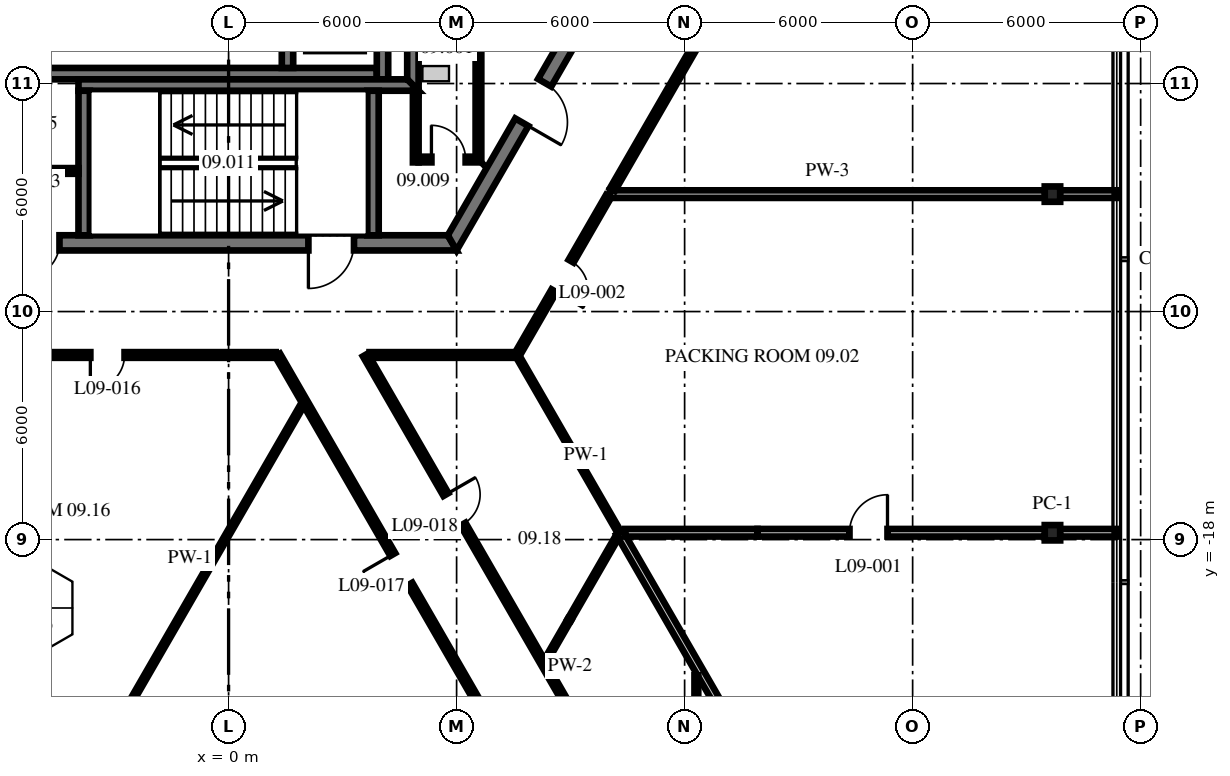
"""IFC4 building model, lengths in metres.
Left out: names, types, materials, properties, quantities, classifications, styles, units other than length and angle.
Written with IfcOpenShell. Run it as: python <this file> out.ifc"""

import sys

from ifc_helpers import new_model, si_unit, direction, frame, frame_2d, origin, origin_2d, place, context, subcontext, project, spatial, polyline, rectangle, i_section, outline, extrude, source, transform, mapped, element, fill, save


model = new_model("IFC4")
c1 = context("Model", 3, precision=1e-05, world=origin(), true_north=direction((0.0, 1.0)))
c2 = subcontext(c1, "Body", "Model", "MODEL_VIEW")
j1 = project(units=[si_unit("LENGTHUNIT", "METRE"), si_unit("PLANEANGLEUNIT", "RADIAN")], contexts=[c1])
p1 = place(None, origin())
s1 = spatial("IfcSite", under=j1, at=p1, CompositionType="ELEMENT")
p2 = place(p1, origin())
s2 = spatial("IfcBuilding", under=s1, at=p2, CompositionType="ELEMENT")
p3 = place(p2, frame((0.0, 0.0, 41.8)))
s3 = spatial("IfcBuildingStorey", under=s2, at=p3, CompositionType="ELEMENT", Elevation=41.8)
m1 = source(origin(), c2, "Body", "SweptSolid", [
    extrude(i_section(OverallWidth=0.404, OverallDepth=0.406, WebThickness=0.027, FlangeThickness=0.044, at=origin_2d()), origin(), (0.0, 0.0, 1.0), 4.3),
])
for number, where, z_axis, x_axis in (
    (1, (21.679, -17.82, 0.0), (0.0, 0.0, 1.0), (0.0, 1.0, 0.0)),
    (2, (21.679, -8.91, 0.0), (0.0, 0.0, 1.0), (0.0, 1.0, 0.0)),
):
    element("IfcColumn", number, at=place(p3, frame(where, z_axis=z_axis, x_axis=x_axis)), inside=s3, PredefinedType="COLUMN", context=c2, shape_type="MappedRepresentation", body=[
        mapped(m1, transform((0.0, 0.0, 0.0), scale=1.0)),
    ])
m2 = source(origin(), c2, "Body", "SweptSolid", [
    extrude(outline(polyline([(-0.115, -0.2), (11.885, -0.2), (11.654, 0.2), (0.115, 0.2), (-0.115, -0.2)])), origin(), (0.0, 0.0, 1.0), 4.1),
])
p4 = place(p3, frame((-5.885, -10.192, 0.0), z_axis=(0.0, 0.0, 1.0), x_axis=(1.0, 0.0, 0.0)))
e3 = element("IfcWall", 3, at=p4, inside=s3, PredefinedType="SHEAR", context=c2, shape_type="MappedRepresentation", body=[
    mapped(m2, transform((0.0, 0.0, 0.0), scale=1.0)),
])
p5 = place(p4, frame((7.985, 0.0, 0.0)))
e4 = element("IfcOpeningElement", 4, at=p5, cuts=e3, PredefinedType="OPENING", context=c2, shape_type="SweptSolid", body=[
    extrude(rectangle(XDim=1.2, YDim=2.1, at=frame_2d((0.6, 1.05))), frame((0.0, 0.21, 0.0), z_axis=(0.0, -1.0, 0.0), x_axis=(1.0, 0.0, 0.0)), (0.0, 0.0, 1.0), 0.42),
])
p6 = place(p4, frame((0.534, 0.0, 0.0)))
e5 = element("IfcOpeningElement", 5, at=p6, cuts=e3, PredefinedType="OPENING", context=c2, shape_type="SweptSolid", body=[
    extrude(rectangle(XDim=0.9, YDim=2.1, at=frame_2d((0.45, 1.05))), frame((0.0, 0.21, 0.0), z_axis=(0.0, -1.0, 0.0), x_axis=(1.0, 0.0, 0.0)), (0.0, 0.0, 1.0), 0.42),
])
p7 = place(p3, frame((5.885, -10.192, 0.0), z_axis=(0.0, 0.0, 1.0), x_axis=(0.499996592174, 0.866027371285, 0.0)))
e6 = element("IfcWall", 6, at=p7, inside=s3, PredefinedType="SHEAR", context=c2, shape_type="MappedRepresentation", body=[
    mapped(m2, transform((0.0, 0.0, 0.0), scale=1.0)),
])
p8 = place(p7, frame((3.665, 0.0, 0.0)))
e7 = element("IfcOpeningElement", 7, at=p8, cuts=e6, PredefinedType="OPENING", context=c2, shape_type="SweptSolid", body=[
    extrude(rectangle(XDim=1.2, YDim=2.1, at=frame_2d((0.6, 1.05))), frame((0.0, 0.21, 0.0), z_axis=(0.0, -1.0, 0.0), x_axis=(1.0, 0.0, 0.0)), (0.0, 0.0, 1.0), 0.42),
])
m3 = source(origin(), c2, "Body", "SweptSolid", [
    extrude(outline(polyline([(12.0, -0.15), (-0.04, -0.15), (-0.213, 0.15), (12.0, 0.15), (12.0, -0.15)])), origin(), (0.0, 0.0, 1.0), 4.1),
])
p9 = place(p3, frame((-8.1, -5.74, 0.0), z_axis=(0.0, 0.0, 1.0), x_axis=(1.0, 0.0, 0.0)))
e8 = element("IfcWall", 8, at=p9, inside=s3, PredefinedType="SHEAR", context=c2, shape_type="MappedRepresentation", body=[
    mapped(m3, transform((0.0, 0.0, 0.0), scale=1.0)),
])
m4 = source(origin(), c2, "Body", "SweptSolid", [
    extrude(rectangle(XDim=2.2, YDim=0.3, at=frame_2d((1.1, 0.0))), origin(), (0.0, 0.0, 1.0), 4.1),
])
p10 = place(p3, frame((1.55, -5.59, 0.0), z_axis=(0.0, 0.0, 1.0), x_axis=(0.0, 1.0, 0.0)))
e9 = element("IfcWall", 9, at=p10, inside=s3, PredefinedType="SHEAR", context=c2, shape_type="MappedRepresentation", body=[
    mapped(m4, transform((0.0, 0.0, 0.0), scale=1.0)),
])
m5 = source(origin(), c2, "Body", "SweptSolid", [
    extrude(rectangle(XDim=2.5, YDim=0.3, at=frame_2d((1.25, 0.0))), origin(), (0.0, 0.0, 1.0), 4.1),
])
p11 = place(p3, frame((4.05, -5.89, 0.0), z_axis=(0.0, 0.0, 1.0), x_axis=(0.0, 1.0, 0.0)))
e10 = element("IfcWall", 10, at=p11, inside=s3, PredefinedType="SHEAR", context=c2, shape_type="MappedRepresentation", body=[
    mapped(m5, transform((0.0, 0.0, 0.0), scale=1.0)),
])
m6 = source(origin(), c2, "Body", "SweptSolid", [
    extrude(outline(polyline([(-0.15, -0.15), (9.99, -0.15), (9.99, 0.15), (0.15, 0.15), (-0.15, -0.15)])), origin(), (0.0, 0.0, 1.0), 4.1),
])
p12 = place(p3, frame((4.85, -6.04, 0.0), z_axis=(0.0, 0.0, 1.0), x_axis=(0.0, 1.0, 0.0)))
e11 = element("IfcWall", 11, at=p12, inside=s3, PredefinedType="SHEAR", context=c2, shape_type="MappedRepresentation", body=[
    mapped(m6, transform((0.0, 0.0, 0.0), scale=1.0)),
])
p13 = place(p12, frame((3.19, 0.0, 0.0)))
e12 = element("IfcOpeningElement", 12, at=p13, cuts=e11, PredefinedType="OPENING", context=c2, shape_type="SweptSolid", body=[
    extrude(rectangle(XDim=1.1, YDim=2.1, at=frame_2d((0.55, 1.05))), frame((0.0, 0.16, 0.0), z_axis=(0.0, -1.0, 0.0), x_axis=(1.0, 0.0, 0.0)), (0.0, 0.0, 1.0), 0.32),
])
m7 = source(origin(), c2, "Body", "SweptSolid", [
    extrude(outline(polyline([(0.0, -0.15), (8.95, -0.15), (8.65, 0.15), (0.0, 0.15), (0.0, -0.15)])), origin(), (0.0, 0.0, 1.0), 4.1),
])
p14 = place(p3, frame((-3.95, -6.04, 0.0), z_axis=(0.0, 0.0, 1.0), x_axis=(1.0, 0.0, 0.0)))
e13 = element("IfcWall", 13, at=p14, inside=s3, PredefinedType="SHEAR", context=c2, shape_type="MappedRepresentation", body=[
    mapped(m7, transform((0.0, 0.0, 0.0), scale=1.0)),
])
m8 = source(origin(), c2, "Body", "SweptSolid", [
    extrude(outline(polyline([(3.8, -0.15), (-0.004, -0.15), (-0.004, 0.15), (3.8, 0.15), (3.8, -0.15)])), origin(), (0.0, 0.0, 1.0), 4.1),
])
for number, where, z_axis, x_axis in (
    (14, (-3.8, -9.99, 0.0), (0.0, 0.0, 1.0), (0.0, 1.0, 0.0)),
    (15, (3.8, -9.99, 0.0), (0.0, 0.0, 1.0), (0.0, 1.0, 0.0)),
):
    element("IfcWall", number, at=place(p3, frame(where, z_axis=z_axis, x_axis=x_axis)), inside=s3, PredefinedType="SHEAR", context=c2, shape_type="MappedRepresentation", body=[
        mapped(m8, transform((0.0, 0.0, 0.0), scale=1.0)),
    ])
m9 = source(origin(), c2, "Body", "SweptSolid", [
    extrude(rectangle(XDim=2.777, YDim=0.15, at=frame_2d((1.389, 0.0))), origin(), (0.0, 0.0, 1.0), 4.1),
])
p15 = place(p3, frame((-6.727, -8.3, 0.0), z_axis=(0.0, 0.0, 1.0), x_axis=(1.0, 0.0, 0.0)))
e16 = element("IfcWall", 16, at=p15, inside=s3, PredefinedType="PARTITIONING", context=c2, shape_type="MappedRepresentation", body=[
    mapped(m9, transform((0.0, 0.0, 0.0), scale=1.0)),
])
m10 = source(origin(), c2, "Body", "SweptSolid", [
    extrude(outline(polyline([(0.0, -0.075), (1.65, -0.075), (1.5, 0.075), (0.0, 0.075), (0.0, -0.075)])), origin(), (0.0, 0.0, 1.0), 4.1),
])
p16 = place(p3, frame((5.0, -8.0, 0.0), z_axis=(0.0, 0.0, 1.0), x_axis=(1.0, 0.0, 0.0)))
e17 = element("IfcWall", 17, at=p16, inside=s3, PredefinedType="PARTITIONING", context=c2, shape_type="MappedRepresentation", body=[
    mapped(m10, transform((0.0, 0.0, 0.0), scale=1.0)),
])
p17 = place(p16, frame((0.337, 0.0, 0.0)))
e18 = element("IfcOpeningElement", 18, at=p17, cuts=e17, PredefinedType="OPENING", context=c2, shape_type="SweptSolid", body=[
    extrude(rectangle(XDim=0.9, YDim=2.1, at=frame_2d((0.45, 1.05))), frame((0.0, 0.085, 0.0), z_axis=(0.0, -1.0, 0.0), x_axis=(1.0, 0.0, 0.0)), (0.0, 0.0, 1.0), 0.17),
])
m11 = source(origin(), c2, "Body", "SweptSolid", [
    extrude(outline(polyline([(-0.075, -0.075), (4.05, -0.075), (4.05, 0.075), (0.075, 0.075), (-0.075, -0.075)])), origin(), (0.0, 0.0, 1.0), 4.1),
])
p18 = place(p3, frame((6.575, -8.0, 0.0), z_axis=(0.0, 0.0, 1.0), x_axis=(0.0, 1.0, 0.0)))
e19 = element("IfcWall", 19, at=p18, inside=s3, PredefinedType="PARTITIONING", context=c2, shape_type="MappedRepresentation", body=[
    mapped(m11, transform((0.0, 0.0, 0.0), scale=1.0)),
])
m12 = source(origin(), c2, "Body", "SweptSolid", [
    extrude(rectangle(XDim=1.885, YDim=0.15, at=frame_2d((0.942, 0.0))), origin(), (0.0, 0.0, 1.0), 4.1),
])
p19 = place(p3, frame((4.925, -8.075, 0.0), z_axis=(0.0, 0.0, 1.0), x_axis=(0.0, 1.0, 0.0)))
e20 = element("IfcWall", 20, at=p19, inside=s3, PredefinedType="PARTITIONING", context=c2, shape_type="MappedRepresentation", body=[
    mapped(m12, transform((0.0, 0.0, 0.0), scale=1.0)),
])
p20 = place(p3, frame((1.289, -13.142, 0.0), z_axis=(0.0, 0.0, 1.0), x_axis=(0.500002274473, -0.866024090613, 0.0)))
e21 = element("IfcWall", 21, at=p20, inside=s3, PredefinedType="PARTITIONING", context=c2, shape_type="SweptSolid", body=[
    extrude(rectangle(XDim=19.385, YDim=0.15, at=frame_2d((9.692, 0.0))), origin(), (0.0, 0.0, 1.0), 4.1),
])
p21 = place(p20, frame((6.062, 0.0, 0.0)))
e22 = element("IfcOpeningElement", 22, at=p21, cuts=e21, PredefinedType="OPENING", context=c2, shape_type="SweptSolid", body=[
    extrude(rectangle(XDim=0.9, YDim=2.1, at=frame_2d((0.45, 1.05))), frame((0.0, 0.085, 0.0), z_axis=(0.0, -1.0, 0.0), x_axis=(1.0, 0.0, 0.0)), (0.0, 0.0, 1.0), 0.17),
])
p22 = place(p20, frame((15.05, 0.0, 0.0)))
e23 = element("IfcOpeningElement", 23, at=p22, cuts=e21, PredefinedType="OPENING", context=c2, shape_type="SweptSolid", body=[
    extrude(rectangle(XDim=0.9, YDim=2.1, at=frame_2d((0.45, 1.05))), frame((0.0, 0.085, 0.0), z_axis=(0.0, -1.0, 0.0), x_axis=(1.0, 0.0, 0.0)), (0.0, 0.0, 1.0), 0.17),
])
p23 = place(p3, frame((3.598, -13.142, 0.0), z_axis=(0.0, 0.0, 1.0), x_axis=(0.499992232847, -0.866029888106, 0.0)))
e24 = element("IfcWall", 24, at=p23, inside=s3, PredefinedType="PARTITIONING", context=c2, shape_type="SweptSolid", body=[
    extrude(rectangle(XDim=19.558, YDim=0.15, at=frame_2d((9.779, 0.0))), origin(), (0.0, 0.0, 1.0), 4.1),
])
p24 = place(p23, frame((4.241, 0.0, 0.0)))
e25 = element("IfcOpeningElement", 25, at=p24, cuts=e24, PredefinedType="OPENING", context=c2, shape_type="SweptSolid", body=[
    extrude(rectangle(XDim=0.9, YDim=2.1, at=frame_2d((0.45, 1.05))), frame((0.0, 0.085, 0.0), z_axis=(0.0, -1.0, 0.0), x_axis=(1.0, 0.0, 0.0)), (0.0, 0.0, 1.0), 0.17),
])
p25 = place(p23, frame((12.972, 0.0, 0.0)))
e26 = element("IfcOpeningElement", 26, at=p25, cuts=e24, PredefinedType="OPENING", context=c2, shape_type="SweptSolid", body=[
    extrude(rectangle(XDim=0.9, YDim=2.1, at=frame_2d((0.45, 1.05))), frame((0.0, 0.085, 0.0), z_axis=(0.0, -1.0, 0.0), x_axis=(1.0, 0.0, 0.0)), (0.0, 0.0, 1.0), 0.17),
])
p26 = place(p23, frame((18.018, 0.0, 0.0)))
e27 = element("IfcOpeningElement", 27, at=p26, cuts=e24, PredefinedType="OPENING", context=c2, shape_type="SweptSolid", body=[
    extrude(rectangle(XDim=0.9, YDim=2.1, at=frame_2d((0.45, 1.05))), frame((0.0, 0.085, 0.0), z_axis=(0.0, -1.0, 0.0), x_axis=(1.0, 0.0, 0.0)), (0.0, 0.0, 1.0), 0.17),
])
p27 = place(p3, frame((7.588, -13.142, 0.0), z_axis=(0.0, 0.0, 1.0), x_axis=(0.499998380488, -0.866026338808, 0.0)))
e28 = element("IfcWall", 28, at=p27, inside=s3, PredefinedType="PARTITIONING", context=c2, shape_type="SweptSolid", body=[
    extrude(rectangle(XDim=5.361, YDim=0.1, at=frame_2d((2.681, 0.0))), origin(), (0.0, 0.0, 1.0), 4.1),
])
p28 = place(p3, frame((10.288, -17.82, 0.0), z_axis=(0.0, 0.0, 1.0), x_axis=(0.500008633047, -0.866020419435, 0.0)))
e29 = element("IfcWall", 29, at=p28, inside=s3, PredefinedType="PARTITIONING", context=c2, shape_type="SweptSolid", body=[
    extrude(rectangle(XDim=13.219, YDim=0.2, at=frame_2d((6.609, 0.0))), origin(), (0.0, 0.0, 1.0), 4.1),
])
p29 = place(p3, frame((10.438, -17.82, 0.0), z_axis=(0.0, 0.0, 1.0), x_axis=(1.0, 0.0, 0.0)))
e30 = element("IfcWall", 30, at=p29, inside=s3, PredefinedType="PARTITIONING", context=c2, shape_type="SweptSolid", body=[
    extrude(rectangle(XDim=3.479, YDim=0.2, at=frame_2d((1.74, 0.0))), origin(), (0.0, 0.0, 1.0), 4.1),
])
m13 = source(origin(), c2, "Body", "SweptSolid", [
    extrude(rectangle(XDim=7.568, YDim=0.2, at=frame_2d((3.784, 0.0))), origin(), (0.0, 0.0, 1.0), 3.488),
])
p30 = place(p3, frame((13.918, -17.82, 0.0), z_axis=(0.0, 0.0, 1.0), x_axis=(1.0, 0.0, 0.0)))
e31 = element("IfcWall", 31, at=p30, inside=s3, PredefinedType="PARTITIONING", context=c2, shape_type="MappedRepresentation", body=[
    mapped(m13, transform((0.0, 0.0, 0.0), scale=1.0)),
])
p31 = place(p30, frame((2.42, 0.0, 0.0)))
e32 = element("IfcOpeningElement", 32, at=p31, cuts=e31, PredefinedType="OPENING", context=c2, shape_type="SweptSolid", body=[
    extrude(rectangle(XDim=1.0, YDim=2.1, at=frame_2d((0.5, 1.05))), frame((0.0, 0.11, 0.0), z_axis=(0.0, -1.0, 0.0), x_axis=(1.0, 0.0, 0.0)), (0.0, 0.0, 1.0), 0.22),
])
m14 = source(origin(), c2, "Body", "SweptSolid", [
    extrude(rectangle(XDim=1.499, YDim=0.2, at=frame_2d((0.749, 0.0))), origin(), (0.0, 0.0, 1.0), 4.1),
])
p32 = place(p3, frame((21.873, -17.82, 0.0), z_axis=(0.0, 0.0, 1.0), x_axis=(1.0, 0.0, 0.0)))
e33 = element("IfcWall", 33, at=p32, inside=s3, PredefinedType="PARTITIONING", context=c2, shape_type="MappedRepresentation", body=[
    mapped(m14, transform((0.0, 0.0, 0.0), scale=1.0)),
])
p33 = place(p3, frame((-7.588, -13.142, 0.0), z_axis=(0.0, 0.0, 1.0), x_axis=(1.0, 0.0, 0.0)))
e34 = element("IfcWall", 34, at=p33, inside=s3, PredefinedType="PARTITIONING", context=c2, shape_type="SweptSolid", body=[
    extrude(rectangle(XDim=8.827, YDim=0.15, at=frame_2d((4.413, 0.0))), origin(), (0.0, 0.0, 1.0), 4.1),
])
p34 = place(p33, frame((3.95, 0.0, 0.0)))
e35 = element("IfcOpeningElement", 35, at=p34, cuts=e34, PredefinedType="OPENING", context=c2, shape_type="SweptSolid", body=[
    extrude(rectangle(XDim=0.9, YDim=2.1, at=frame_2d((0.45, 1.05))), frame((0.0, 0.085, 0.0), z_axis=(0.0, -1.0, 0.0), x_axis=(1.0, 0.0, 0.0)), (0.0, 0.0, 1.0), 0.17),
])
p35 = place(p3, frame((3.708, -13.142, 0.0), z_axis=(0.0, 0.0, 1.0), x_axis=(1.0, 0.0, 0.0)))
e36 = element("IfcWall", 36, at=p35, inside=s3, PredefinedType="PARTITIONING", context=c2, shape_type="SweptSolid", body=[
    extrude(rectangle(XDim=3.859, YDim=0.15, at=frame_2d((1.93, 0.0))), origin(), (0.0, 0.0, 1.0), 4.1),
])
m15 = source(origin(), c2, "Body", "SweptSolid", [
    extrude(rectangle(XDim=11.455, YDim=0.2, at=frame_2d((5.728, 0.0))), origin(), (0.0, 0.0, 1.0), 3.343),
])
p36 = place(p3, frame((10.031, -8.91, 0.0), z_axis=(0.0, 0.0, 1.0), x_axis=(1.0, 0.0, 0.0)))
e37 = element("IfcWall", 37, at=p36, inside=s3, PredefinedType="PARTITIONING", context=c2, shape_type="MappedRepresentation", body=[
    mapped(m15, transform((0.0, 0.0, 0.0), scale=1.0)),
])
p37 = place(p3, frame((21.873, -8.91, 0.0), z_axis=(0.0, 0.0, 1.0), x_axis=(1.0, 0.0, 0.0)))
e38 = element("IfcWall", 38, at=p37, inside=s3, PredefinedType="PARTITIONING", context=c2, shape_type="MappedRepresentation", body=[
    mapped(m14, transform((0.0, 0.0, 0.0), scale=1.0)),
])
m16 = source(origin(), c2, "Body", "SweptSolid", [
    extrude(rectangle(XDim=1.259, YDim=0.1, at=frame_2d((0.629, 0.0))), origin(), (0.0, 0.0, 1.0), 3.488),
])
p38 = place(p3, frame((8.339, -21.197, 0.0), z_axis=(0.0, 0.0, 1.0), x_axis=(0.499935087192, 0.866062877968, 0.0)))
e39 = element("IfcWall", 39, at=p38, inside=s3, PredefinedType="PARTITIONING", context=c2, shape_type="MappedRepresentation", body=[
    mapped(m16, transform((0.0, 0.0, 0.0), scale=1.0)),
])
p39 = place(p3, frame((8.968, -20.107, 0.0), z_axis=(0.0, 0.0, 1.0), x_axis=(0.500066192889, 0.865987183929, 0.0)))
e40 = element("IfcWall", 40, at=p39, inside=s3, PredefinedType="PARTITIONING", context=c2, shape_type="SweptSolid", body=[
    extrude(rectangle(XDim=2.521, YDim=0.1, at=frame_2d((1.26, 0.0))), origin(), (0.0, 0.0, 1.0), 4.1),
])
p40 = place(p3, frame((7.603, -13.116, 0.0), z_axis=(0.0, 0.0, 1.0), x_axis=(0.500011970786, 0.866018492338, 0.0)))
e41 = element("IfcWall", 41, at=p40, inside=s3, PredefinedType="PARTITIONING", context=c2, shape_type="SweptSolid", body=[
    extrude(rectangle(XDim=4.793, YDim=0.15, at=frame_2d((2.397, 0.0))), origin(), (0.0, 0.0, 1.0), 4.1),
])
p41 = place(p40, frame((1.92, 0.0, 0.0)))
e42 = element("IfcOpeningElement", 42, at=p41, cuts=e41, PredefinedType="OPENING", context=c2, shape_type="SweptSolid", body=[
    extrude(rectangle(XDim=0.9, YDim=2.1, at=frame_2d((0.45, 1.05))), frame((0.0, 0.085, 0.0), z_axis=(0.0, -1.0, 0.0), x_axis=(1.0, 0.0, 0.0)), (0.0, 0.0, 1.0), 0.17),
])
p42 = place(p3, frame((10.1, -8.792, 0.0), z_axis=(0.0, 0.0, 1.0), x_axis=(0.499985875816, 0.866033558232, 0.0)))
e43 = element("IfcWall", 43, at=p42, inside=s3, PredefinedType="PARTITIONING", context=c2, shape_type="SweptSolid", body=[
    extrude(rectangle(XDim=10.082, YDim=0.15, at=frame_2d((5.041, 0.0))), origin(), (0.0, 0.0, 1.0), 4.1),
])
m17 = source(origin(), c2, "Body", "SweptSolid", [
    extrude(rectangle(XDim=9.953, YDim=0.1, at=frame_2d((4.977, 0.0))), origin(), (0.0, 0.0, 1.0), 3.343),
])
p43 = place(p3, frame((-3.027, -23.063, 0.0), z_axis=(0.0, 0.0, 1.0), x_axis=(0.499990692214, 0.866030777571, 0.0)))
e44 = element("IfcWall", 44, at=p43, inside=s3, PredefinedType="PARTITIONING", context=c2, shape_type="MappedRepresentation", body=[
    mapped(m17, transform((0.0, 0.0, 0.0), scale=1.0)),
])
p44 = place(p3, frame((12.309, -28.04, 0.0), z_axis=(0.0, 0.0, 1.0), x_axis=(0.0, 1.0, 0.0)))
e45 = element("IfcWall", 45, at=p44, inside=s3, PredefinedType="PARTITIONING", context=c2, shape_type="SweptSolid", body=[
    extrude(rectangle(XDim=6.47, YDim=0.1, at=frame_2d((3.235, 0.0))), origin(), (0.0, 0.0, 1.0), 4.1),
])
p45 = place(p5, frame((1.2, 0.0, 0.0), z_axis=(0.0, 0.0, 1.0), x_axis=(-1.0, 0.0, 0.0)))
e46 = element("IfcDoor", 46, at=p45, inside=s3, OperationType="SINGLE_SWING_RIGHT", PredefinedType="DOOR", context=c2, shape_type="SweptSolid", body=[
    extrude(rectangle(XDim=1.2, YDim=2.1, at=frame_2d((0.6, 1.05))), frame((0.0, 0.025, 0.0), z_axis=(0.0, -1.0, 0.0), x_axis=(1.0, 0.0, 0.0)), (0.0, 0.0, 1.0), 0.05),
])
fill(e4, e46)
p46 = place(p8, frame((1.2, 0.0, 0.0), z_axis=(0.0, 0.0, 1.0), x_axis=(-1.0, 0.0, 0.0)))
e47 = element("IfcDoor", 47, at=p46, inside=s3, OperationType="SINGLE_SWING_RIGHT", PredefinedType="DOOR", context=c2, shape_type="SweptSolid", body=[
    extrude(rectangle(XDim=1.2, YDim=2.1, at=frame_2d((0.6, 1.05))), frame((0.0, 0.025, 0.0), z_axis=(0.0, -1.0, 0.0), x_axis=(1.0, 0.0, 0.0)), (0.0, 0.0, 1.0), 0.05),
])
fill(e7, e47)
p47 = place(p6, frame((0.9, 0.0, 0.0), z_axis=(0.0, 0.0, 1.0), x_axis=(-1.0, 0.0, 0.0)))
e48 = element("IfcDoor", 48, at=p47, inside=s3, OperationType="SINGLE_SWING_RIGHT", PredefinedType="DOOR", context=c2, shape_type="SweptSolid", body=[
    extrude(rectangle(XDim=0.9, YDim=2.1, at=frame_2d((0.45, 1.05))), frame((0.0, 0.025, 0.0), z_axis=(0.0, -1.0, 0.0), x_axis=(1.0, 0.0, 0.0)), (0.0, 0.0, 1.0), 0.05),
])
fill(e5, e48)
p48 = place(p17, origin())
e49 = element("IfcDoor", 49, at=p48, inside=s3, OperationType="SINGLE_SWING_LEFT", PredefinedType="DOOR", context=c2, shape_type="SweptSolid", body=[
    extrude(rectangle(XDim=0.9, YDim=2.1, at=frame_2d((0.45, 1.05))), frame((0.0, 0.025, 0.0), z_axis=(0.0, -1.0, 0.0), x_axis=(1.0, 0.0, 0.0)), (0.0, 0.0, 1.0), 0.05),
])
fill(e18, e49)
p49 = place(p31, origin())
e50 = element("IfcDoor", 50, at=p49, inside=s3, OperationType="SINGLE_SWING_LEFT", PredefinedType="DOOR", context=c2, shape_type="SweptSolid", body=[
    extrude(rectangle(XDim=1.0, YDim=2.1, at=frame_2d((0.5, 1.05))), frame((0.0, 0.025, 0.0), z_axis=(0.0, -1.0, 0.0), x_axis=(1.0, 0.0, 0.0)), (0.0, 0.0, 1.0), 0.05),
])
fill(e32, e50)
p50 = place(p41, origin())
e51 = element("IfcDoor", 51, at=p50, inside=s3, OperationType="SINGLE_SWING_RIGHT", PredefinedType="DOOR", context=c2, shape_type="SweptSolid", body=[
    extrude(rectangle(XDim=0.9, YDim=2.1, at=frame_2d((0.45, 1.05))), frame((0.0, 0.025, 0.0), z_axis=(0.0, -1.0, 0.0), x_axis=(1.0, 0.0, 0.0)), (0.0, 0.0, 1.0), 0.05),
])
fill(e42, e51)
p51 = place(p34, origin())
e52 = element("IfcDoor", 52, at=p51, inside=s3, OperationType="SINGLE_SWING_RIGHT", PredefinedType="DOOR", context=c2, shape_type="SweptSolid", body=[
    extrude(rectangle(XDim=0.9, YDim=2.1, at=frame_2d((0.45, 1.05))), frame((0.0, 0.025, 0.0), z_axis=(0.0, -1.0, 0.0), x_axis=(1.0, 0.0, 0.0)), (0.0, 0.0, 1.0), 0.05),
])
fill(e35, e52)
p52 = place(p21, origin())
e53 = element("IfcDoor", 53, at=p52, inside=s3, OperationType="SINGLE_SWING_RIGHT", PredefinedType="DOOR", context=c2, shape_type="SweptSolid", body=[
    extrude(rectangle(XDim=0.9, YDim=2.1, at=frame_2d((0.45, 1.05))), frame((0.0, 0.025, 0.0), z_axis=(0.0, -1.0, 0.0), x_axis=(1.0, 0.0, 0.0)), (0.0, 0.0, 1.0), 0.05),
])
fill(e22, e53)
p53 = place(p24, origin())
e54 = element("IfcDoor", 54, at=p53, inside=s3, OperationType="SINGLE_SWING_LEFT", PredefinedType="DOOR", context=c2, shape_type="SweptSolid", body=[
    extrude(rectangle(XDim=0.9, YDim=2.1, at=frame_2d((0.45, 1.05))), frame((0.0, 0.025, 0.0), z_axis=(0.0, -1.0, 0.0), x_axis=(1.0, 0.0, 0.0)), (0.0, 0.0, 1.0), 0.05),
])
fill(e25, e54)
save(model, sys.argv[1])
